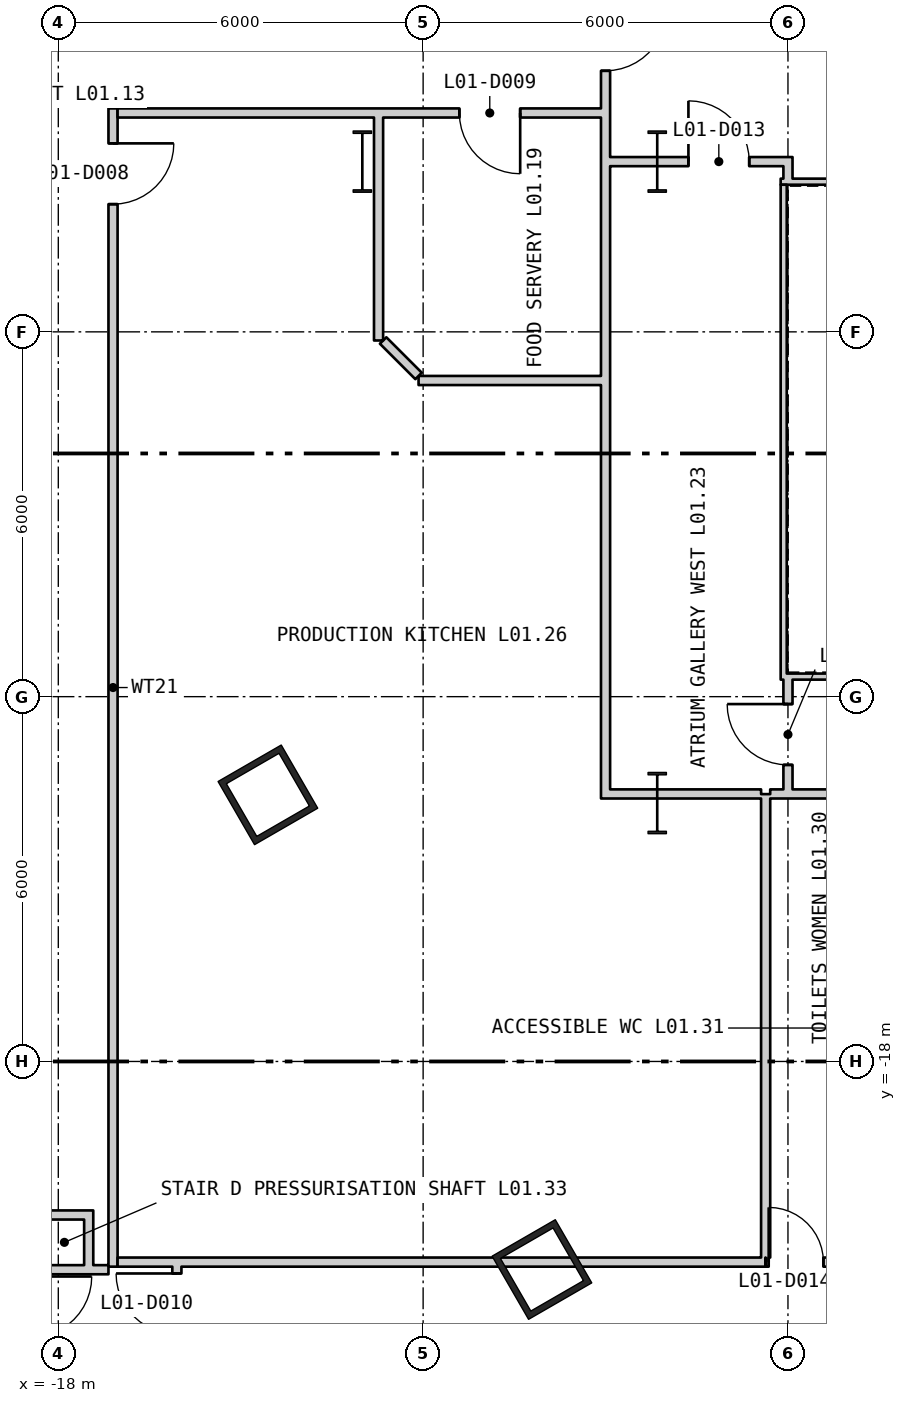
"""IFC4 building model, lengths in metres.
Left out: names, types, materials, properties, quantities, classifications, styles, units other than length and angle.
Written with IfcOpenShell. Run it as: python <this file> out.ifc"""

import sys

from ifc_helpers import new_model, si_unit, direction, frame, frame_2d, origin, origin_2d, place, context, subcontext, project, spatial, rectangle, hollow_rectangle, i_section, extrude, element, fill, save


model = new_model("IFC4")
c1 = context("Model", 3, precision=1e-05, world=origin(), true_north=direction((0.0, 1.0)))
c2 = subcontext(c1, "Body", "Model", "MODEL_VIEW")
j1 = project(units=[si_unit("LENGTHUNIT", "METRE"), si_unit("PLANEANGLEUNIT", "RADIAN")], contexts=[c1])
p1 = place(None, origin())
s1 = spatial("IfcSite", under=j1, at=p1, CompositionType="ELEMENT")
p2 = place(p1, origin())
s2 = spatial("IfcBuilding", under=s1, at=p2, CompositionType="ELEMENT")
p3 = place(p2, frame((0.0, 0.0, 8.4)))
s3 = spatial("IfcBuildingStorey", under=s2, at=p3, CompositionType="ELEMENT", Elevation=8.4)
for number, where, z_axis, x_axis in (
    (1, (-14.553, -13.615, 0.0), (0.0, 0.0, 1.0), (0.5, -0.866, 0.0)),
    (2, (-10.046, -21.422, 0.0), (0.0, 0.0, 1.0), (0.5, -0.866, 0.0)),
):
    element("IfcColumn", number, at=place(p3, frame(where, z_axis=z_axis, x_axis=x_axis)), inside=s3, PredefinedType="COLUMN", context=c2, shape_type="SweptSolid", body=[
        extrude(hollow_rectangle(XDim=1.2, YDim=1.2, WallThickness=0.1, at=origin_2d()), origin(), (0.0, 0.0, 1.0), 5.1),
    ])
for number, where, z_axis, x_axis in (
    (3, (-8.15, -3.2, 0.0), (0.0, 0.0, 1.0), (1.0, 0.0, 0.0)),
    (4, (-8.15, -13.75, 0.0), (0.0, 0.0, 1.0), (1.0, 0.0, 0.0)),
    (5, (-13.0, -3.2, 0.0), (0.0, 0.0, 1.0), (1.0, 0.0, 0.0)),
):
    element("IfcColumn", number, at=place(p3, frame(where, z_axis=z_axis, x_axis=x_axis)), inside=s3, PredefinedType="COLUMN", context=c2, shape_type="SweptSolid", body=[
        extrude(i_section(OverallWidth=0.302, OverallDepth=1.008, WebThickness=0.021, FlangeThickness=0.04, at=origin_2d()), origin(), (0.0, 0.0, 1.0), 5.1),
    ])
for number, where, z_axis, x_axis in (
    (6, (-6.12, -11.67, 0.0), (0.0, 0.0, 1.0), (1.0, 0.0, 0.0)),
    (7, (6.12, -3.53, 0.0), (0.0, 0.0, 1.0), (-1.0, 0.0, 0.0)),
):
    element("IfcWall", number, at=place(p3, frame(where, z_axis=z_axis, x_axis=x_axis)), inside=s3, PredefinedType="PARTITIONING", context=c2, shape_type="SweptSolid", body=[
        extrude(rectangle(XDim=12.24, YDim=0.1, at=frame_2d((6.12, 0.0))), origin(), (0.0, 0.0, 1.0), 4.88),
    ])
p4 = place(p3, frame((-6.07, -3.58, 0.0), z_axis=(0.0, 0.0, 1.0), x_axis=(0.0, -1.0, 0.0)))
e8 = element("IfcWall", 8, at=p4, inside=s3, PredefinedType="PARTITIONING", context=c2, shape_type="SweptSolid", body=[
    extrude(rectangle(XDim=8.04, YDim=0.1, at=frame_2d((4.02, 0.0))), origin(), (0.0, 0.0, 1.0), 4.88),
])
for number, where, z_axis, x_axis in (
    (9, (-18.225, -21.425, 0.0), (0.0, 0.0, 1.0), (1.0, 0.0, 0.0)),
    (10, (-18.225, -20.525, 0.0), (0.0, 0.0, 1.0), (1.0, 0.0, 0.0)),
):
    element("IfcWall", number, at=place(p3, frame(where, z_axis=z_axis, x_axis=x_axis)), inside=s3, PredefinedType="PARTITIONING", context=c2, shape_type="SweptSolid", body=[
        extrude(rectangle(XDim=0.65, YDim=0.15, at=frame_2d((0.325, 0.0))), origin(), (0.0, 0.0, 1.0), 4.88),
    ])
p5 = place(p3, frame((-17.5, -21.5, 0.0), z_axis=(0.0, 0.0, 1.0), x_axis=(0.0, 1.0, 0.0)))
e11 = element("IfcWall", 11, at=p5, inside=s3, PredefinedType="PARTITIONING", context=c2, shape_type="SweptSolid", body=[
    extrude(rectangle(XDim=1.05, YDim=0.15, at=frame_2d((0.525, 0.0))), origin(), (0.0, 0.0, 1.0), 4.88),
])
p6 = place(p3, frame((-17.425, -21.425, 0.0), z_axis=(0.0, 0.0, 1.0), x_axis=(1.0, 0.0, 0.0)))
e12 = element("IfcWall", 12, at=p6, inside=s3, PredefinedType="PARTITIONING", context=c2, shape_type="SweptSolid", body=[
    extrude(rectangle(XDim=0.25, YDim=0.15, at=frame_2d((0.125, 0.0))), origin(), (0.0, 0.0, 1.0), 4.88),
])
p7 = place(p3, frame((-17.1, -21.375, 0.0), z_axis=(0.0, 0.0, 1.0), x_axis=(0.0, 1.0, 0.0)))
e13 = element("IfcWall", 13, at=p7, inside=s3, PredefinedType="PARTITIONING", context=c2, shape_type="SweptSolid", body=[
    extrude(rectangle(XDim=19.05, YDim=0.15, at=frame_2d((9.525, 0.0))), origin(), (0.0, 0.0, 1.0), 4.88),
])
p8 = place(p7, frame((17.475, 0.0, 0.0)))
e14 = element("IfcOpeningElement", 14, at=p8, cuts=e13, PredefinedType="OPENING", context=c2, shape_type="SweptSolid", body=[
    extrude(rectangle(XDim=1.0, YDim=2.1, at=frame_2d((0.5, 1.05))), frame((0.0, 0.085, 0.0), z_axis=(0.0, -1.0, 0.0), x_axis=(1.0, 0.0, 0.0)), (0.0, 0.0, 1.0), 0.17),
])
p9 = place(p3, frame((-17.025, -21.3, 0.0), z_axis=(0.0, 0.0, 1.0), x_axis=(1.0, 0.0, 0.0)))
e15 = element("IfcWall", 15, at=p9, inside=s3, PredefinedType="PARTITIONING", context=c2, shape_type="SweptSolid", body=[
    extrude(rectangle(XDim=10.655, YDim=0.15, at=frame_2d((5.327, 0.0))), origin(), (0.0, 0.0, 1.0), 4.88),
])
p10 = place(p3, frame((-17.025, -2.4, 0.0), z_axis=(0.0, 0.0, 1.0), x_axis=(1.0, 0.0, 0.0)))
e16 = element("IfcWall", 16, at=p10, inside=s3, PredefinedType="PARTITIONING", context=c2, shape_type="SweptSolid", body=[
    extrude(rectangle(XDim=7.95, YDim=0.15, at=frame_2d((3.975, 0.0))), origin(), (0.0, 0.0, 1.0), 4.88),
])
p11 = place(p10, frame((5.621, 0.0, 0.0)))
e17 = element("IfcOpeningElement", 17, at=p11, cuts=e16, PredefinedType="OPENING", context=c2, shape_type="SweptSolid", body=[
    extrude(rectangle(XDim=1.0, YDim=2.1, at=frame_2d((0.5, 1.05))), frame((0.0, 0.085, 0.0), z_axis=(0.0, -1.0, 0.0), x_axis=(1.0, 0.0, 0.0)), (0.0, 0.0, 1.0), 0.17),
])
p12 = place(p3, frame((-16.05, -23.55, 0.0), z_axis=(0.0, 0.0, 1.0), x_axis=(0.0, 1.0, 0.0)))
e18 = element("IfcWall", 18, at=p12, inside=s3, PredefinedType="PARTITIONING", context=c2, shape_type="SweptSolid", body=[
    extrude(rectangle(XDim=2.175, YDim=0.15, at=frame_2d((1.087, 0.0))), origin(), (0.0, 0.0, 1.0), 4.88),
])
p13 = place(p12, frame((1.063, 0.0, 0.0)))
e19 = element("IfcOpeningElement", 19, at=p13, cuts=e18, PredefinedType="OPENING", context=c2, shape_type="SweptSolid", body=[
    extrude(rectangle(XDim=1.0, YDim=2.1, at=frame_2d((0.5, 1.05))), frame((0.0, 0.085, 0.0), z_axis=(0.0, -1.0, 0.0), x_axis=(1.0, 0.0, 0.0)), (0.0, 0.0, 1.0), 0.17),
])
p14 = place(p3, frame((-12.733, -6.142, 0.0), z_axis=(0.0, 0.0, 1.0), x_axis=(0.0, 1.0, 0.0)))
e20 = element("IfcWall", 20, at=p14, inside=s3, PredefinedType="PARTITIONING", context=c2, shape_type="SweptSolid", body=[
    extrude(rectangle(XDim=3.042, YDim=0.15, at=frame_2d((1.521, 0.0))), origin(), (0.0, 0.0, 1.0), 4.19),
])
p15 = place(p3, frame((-12.733, -3.1, 0.0), z_axis=(0.0, 0.0, 1.0), x_axis=(0.0, 1.0, 0.0)))
e21 = element("IfcWall", 21, at=p15, inside=s3, PredefinedType="PARTITIONING", context=c2, shape_type="SweptSolid", body=[
    extrude(rectangle(XDim=0.625, YDim=0.15, at=frame_2d((0.312, 0.0))), origin(), (0.0, 0.0, 1.0), 4.28),
])
p16 = place(p3, frame((-12.658, -6.142, 0.0), z_axis=(0.0, 0.0, 1.0), x_axis=(0.707106781187, -0.707106781187, 0.0)))
e22 = element("IfcWall", 22, at=p16, inside=s3, PredefinedType="PARTITIONING", context=c2, shape_type="SweptSolid", body=[
    extrude(rectangle(XDim=0.825, YDim=0.15, at=frame_2d((0.412, 0.0))), origin(), (0.0, 0.0, 1.0), 4.88),
])
p17 = place(p3, frame((-12.075, -6.8, 0.0), z_axis=(0.0, 0.0, 1.0), x_axis=(1.0, 0.0, 0.0)))
e23 = element("IfcWall", 23, at=p17, inside=s3, PredefinedType="PARTITIONING", context=c2, shape_type="SweptSolid", body=[
    extrude(rectangle(XDim=3.0, YDim=0.15, at=frame_2d((1.5, 0.0))), origin(), (0.0, 0.0, 1.0), 4.88),
])
p18 = place(p3, frame((-9.0, -13.675, 0.0), z_axis=(0.0, 0.0, 1.0), x_axis=(0.0, 1.0, 0.0)))
e24 = element("IfcWall", 24, at=p18, inside=s3, PredefinedType="PARTITIONING", context=c2, shape_type="SweptSolid", body=[
    extrude(rectangle(XDim=13.675, YDim=0.15, at=frame_2d((6.838, 0.0))), origin(), (0.0, 0.0, 1.0), 4.88),
])
p19 = place(p18, frame((11.969, 0.0, 0.0)))
e25 = element("IfcOpeningElement", 25, at=p19, cuts=e24, PredefinedType="OPENING", context=c2, shape_type="SweptSolid", body=[
    extrude(rectangle(XDim=1.0, YDim=2.1, at=frame_2d((0.5, 1.05))), frame((0.0, 0.085, 0.0), z_axis=(0.0, -1.0, 0.0), x_axis=(1.0, 0.0, 0.0)), (0.0, 0.0, 1.0), 0.17),
])
p20 = place(p3, frame((-8.925, -13.6, 0.0), z_axis=(0.0, 0.0, 1.0), x_axis=(1.0, 0.0, 0.0)))
e26 = element("IfcWall", 26, at=p20, inside=s3, PredefinedType="PARTITIONING", context=c2, shape_type="SweptSolid", body=[
    extrude(rectangle(XDim=0.775, YDim=0.15, at=frame_2d((0.388, 0.0))), origin(), (0.0, 0.0, 1.0), 4.09),
])
p21 = place(p3, frame((-8.15, -13.6, 0.0), z_axis=(0.0, 0.0, 1.0), x_axis=(1.0, 0.0, 0.0)))
e27 = element("IfcWall", 27, at=p21, inside=s3, PredefinedType="PARTITIONING", context=c2, shape_type="SweptSolid", body=[
    extrude(rectangle(XDim=1.708, YDim=0.15, at=frame_2d((0.854, 0.0))), origin(), (0.0, 0.0, 1.0), 3.97),
])
p22 = place(p3, frame((-8.925, -3.2, 0.0), z_axis=(0.0, 0.0, 1.0), x_axis=(1.0, 0.0, 0.0)))
e28 = element("IfcWall", 28, at=p22, inside=s3, PredefinedType="PARTITIONING", context=c2, shape_type="SweptSolid", body=[
    extrude(rectangle(XDim=0.775, YDim=0.15, at=frame_2d((0.388, 0.0))), origin(), (0.0, 0.0, 1.0), 4.09),
])
p23 = place(p3, frame((-8.15, -3.2, 0.0), z_axis=(0.0, 0.0, 1.0), x_axis=(1.0, 0.0, 0.0)))
e29 = element("IfcWall", 29, at=p23, inside=s3, PredefinedType="PARTITIONING", context=c2, shape_type="SweptSolid", body=[
    extrude(rectangle(XDim=2.225, YDim=0.15, at=frame_2d((1.113, 0.0))), origin(), (0.0, 0.0, 1.0), 3.97),
])
p24 = place(p23, frame((0.513, 0.0, 0.0)))
e30 = element("IfcOpeningElement", 30, at=p24, cuts=e29, PredefinedType="OPENING", context=c2, shape_type="SweptSolid", body=[
    extrude(rectangle(XDim=1.0, YDim=2.1, at=frame_2d((0.5, 1.05))), frame((0.0, 0.085, 0.0), z_axis=(0.0, -1.0, 0.0), x_axis=(1.0, 0.0, 0.0)), (0.0, 0.0, 1.0), 0.17),
])
p25 = place(p3, frame((-6.367, -21.3, 0.0), z_axis=(0.0, 0.0, 1.0), x_axis=(1.0, 0.0, 0.0)))
e31 = element("IfcWall", 31, at=p25, inside=s3, PredefinedType="PARTITIONING", context=c2, shape_type="SweptSolid", body=[
    extrude(rectangle(XDim=1.748, YDim=0.15, at=frame_2d((0.874, 0.0))), origin(), (0.0, 0.0, 1.0), 4.88),
])
p26 = place(p25, frame((0.05, 0.0, 0.0)))
e32 = element("IfcOpeningElement", 32, at=p26, cuts=e31, PredefinedType="OPENING", context=c2, shape_type="SweptSolid", body=[
    extrude(rectangle(XDim=0.9, YDim=2.1, at=frame_2d((0.45, 1.05))), frame((0.0, 0.085, 0.0), z_axis=(0.0, -1.0, 0.0), x_axis=(1.0, 0.0, 0.0)), (0.0, 0.0, 1.0), 0.17),
])
p27 = place(p3, frame((-6.367, -21.225, 0.0), z_axis=(0.0, 0.0, 1.0), x_axis=(0.0, 1.0, 0.0)))
e33 = element("IfcWall", 33, at=p27, inside=s3, PredefinedType="PARTITIONING", context=c2, shape_type="SweptSolid", body=[
    extrude(rectangle(XDim=7.622, YDim=0.15, at=frame_2d((3.811, 0.0))), origin(), (0.0, 0.0, 1.0), 4.28),
])
p28 = place(p3, frame((-6.292, -13.6, 0.0), z_axis=(0.0, 0.0, 1.0), x_axis=(1.0, 0.0, 0.0)))
e34 = element("IfcWall", 34, at=p28, inside=s3, PredefinedType="PARTITIONING", context=c2, shape_type="SweptSolid", body=[
    extrude(rectangle(XDim=1.673, YDim=0.15, at=frame_2d((0.837, 0.0))), origin(), (0.0, 0.0, 1.0), 3.97),
])
p29 = place(p3, frame((-6.0, -13.525, 0.0), z_axis=(0.0, 0.0, 1.0), x_axis=(0.0, 1.0, 0.0)))
e35 = element("IfcWall", 35, at=p29, inside=s3, PredefinedType="PARTITIONING", context=c2, shape_type="SweptSolid", body=[
    extrude(rectangle(XDim=1.805, YDim=0.15, at=frame_2d((0.902, 0.0))), origin(), (0.0, 0.0, 1.0), 4.88),
])
p30 = place(p29, frame((0.403, 0.0, 0.0)))
e36 = element("IfcOpeningElement", 36, at=p30, cuts=e35, PredefinedType="OPENING", context=c2, shape_type="SweptSolid", body=[
    extrude(rectangle(XDim=1.0, YDim=2.1, at=frame_2d((0.5, 1.05))), frame((0.0, 0.085, 0.0), z_axis=(0.0, -1.0, 0.0), x_axis=(1.0, 0.0, 0.0)), (0.0, 0.0, 1.0), 0.17),
])
p31 = place(p3, frame((-6.0, -3.48, 0.0), z_axis=(0.0, 0.0, 1.0), x_axis=(0.0, 1.0, 0.0)))
e37 = element("IfcWall", 37, at=p31, inside=s3, PredefinedType="PARTITIONING", context=c2, shape_type="SweptSolid", body=[
    extrude(rectangle(XDim=0.205, YDim=0.15, at=frame_2d((0.102, 0.0))), origin(), (0.0, 0.0, 1.0), 4.88),
])
p32 = place(p8, origin())
e38 = element("IfcDoor", 38, at=p32, inside=s3, OperationType="SINGLE_SWING_RIGHT", PredefinedType="DOOR", context=c2, shape_type="SweptSolid", body=[
    extrude(rectangle(XDim=1.0, YDim=2.1, at=frame_2d((0.5, 1.05))), frame((0.0, 0.025, 0.0), z_axis=(0.0, -1.0, 0.0), x_axis=(1.0, 0.0, 0.0)), (0.0, 0.0, 1.0), 0.05),
])
fill(e14, e38)
p33 = place(p11, origin())
e39 = element("IfcDoor", 39, at=p33, inside=s3, OperationType="SINGLE_SWING_RIGHT", PredefinedType="DOOR", context=c2, shape_type="SweptSolid", body=[
    extrude(rectangle(XDim=1.0, YDim=2.1, at=frame_2d((0.5, 1.05))), frame((0.0, 0.025, 0.0), z_axis=(0.0, -1.0, 0.0), x_axis=(1.0, 0.0, 0.0)), (0.0, 0.0, 1.0), 0.05),
])
fill(e17, e39)
p34 = place(p13, origin())
e40 = element("IfcDoor", 40, at=p34, inside=s3, OperationType="SINGLE_SWING_LEFT", PredefinedType="DOOR", context=c2, shape_type="SweptSolid", body=[
    extrude(rectangle(XDim=1.0, YDim=2.1, at=frame_2d((0.5, 1.05))), frame((0.0, 0.025, 0.0), z_axis=(0.0, -1.0, 0.0), x_axis=(1.0, 0.0, 0.0)), (0.0, 0.0, 1.0), 0.05),
])
fill(e19, e40)
p35 = place(p19, origin())
e41 = element("IfcDoor", 41, at=p35, inside=s3, OperationType="SINGLE_SWING_RIGHT", PredefinedType="DOOR", context=c2, shape_type="SweptSolid", body=[
    extrude(rectangle(XDim=1.0, YDim=2.1, at=frame_2d((0.5, 1.05))), frame((0.0, 0.025, 0.0), z_axis=(0.0, -1.0, 0.0), x_axis=(1.0, 0.0, 0.0)), (0.0, 0.0, 1.0), 0.05),
])
fill(e25, e41)
p36 = place(p24, origin())
e42 = element("IfcDoor", 42, at=p36, inside=s3, OperationType="SINGLE_SWING_RIGHT", PredefinedType="DOOR", context=c2, shape_type="SweptSolid", body=[
    extrude(rectangle(XDim=1.0, YDim=2.1, at=frame_2d((0.5, 1.05))), frame((0.0, 0.025, 0.0), z_axis=(0.0, -1.0, 0.0), x_axis=(1.0, 0.0, 0.0)), (0.0, 0.0, 1.0), 0.05),
])
fill(e30, e42)
p37 = place(p26, origin())
e43 = element("IfcDoor", 43, at=p37, inside=s3, OperationType="SINGLE_SWING_RIGHT", PredefinedType="DOOR", context=c2, shape_type="SweptSolid", body=[
    extrude(rectangle(XDim=0.9, YDim=2.1, at=frame_2d((0.45, 1.05))), frame((0.0, 0.025, 0.0), z_axis=(0.0, -1.0, 0.0), x_axis=(1.0, 0.0, 0.0)), (0.0, 0.0, 1.0), 0.05),
])
fill(e32, e43)
p38 = place(p30, origin())
e44 = element("IfcDoor", 44, at=p38, inside=s3, OperationType="SINGLE_SWING_LEFT", PredefinedType="DOOR", context=c2, shape_type="SweptSolid", body=[
    extrude(rectangle(XDim=1.0, YDim=2.1, at=frame_2d((0.5, 1.05))), frame((0.0, 0.025, 0.0), z_axis=(0.0, -1.0, 0.0), x_axis=(1.0, 0.0, 0.0)), (0.0, 0.0, 1.0), 0.05),
])
fill(e36, e44)
save(model, sys.argv[1])
